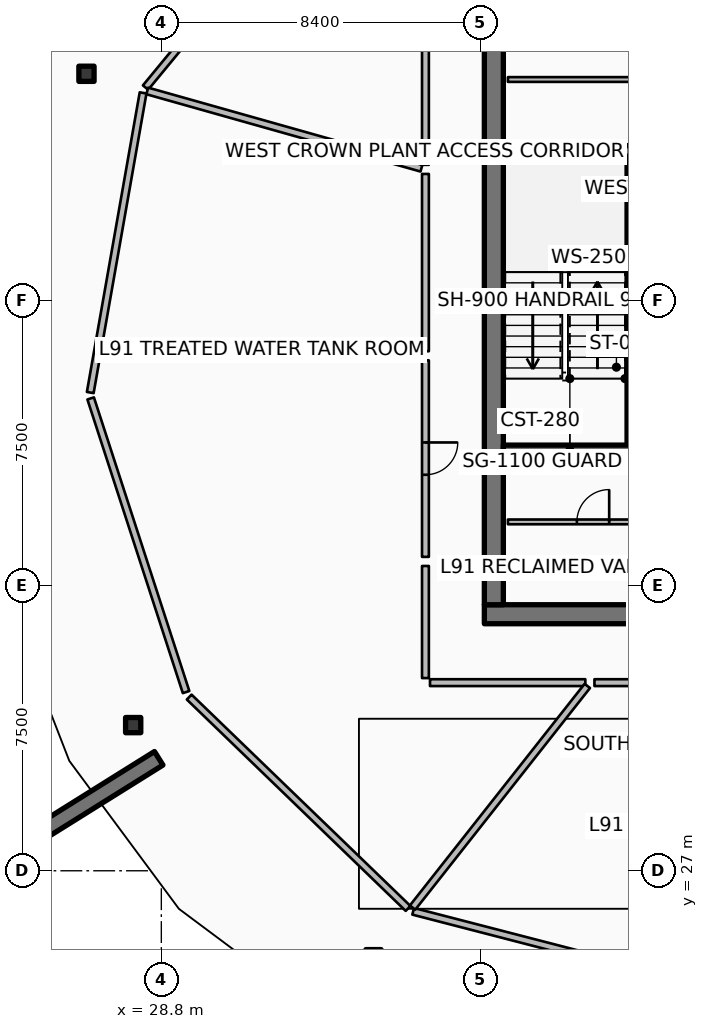
"""IFC4 building model, lengths in metres.
Left out: names, types, materials, properties, quantities, classifications, styles, units other than length and angle.
Written with IfcOpenShell. Run it as: python <this file> out.ifc"""

import sys

from ifc_helpers import new_model, si_unit, direction, frame, frame_2d, origin, origin_2d, place, context, subcontext, project, spatial, rectangle, hollow_rectangle, extrude, element, fill, save


model = new_model("IFC4")
c1 = context("Model", 3, precision=1e-05, world=origin(), true_north=direction((0.0, 1.0)))
c2 = subcontext(c1, "Body", "Model", "MODEL_VIEW")
j1 = project(units=[si_unit("LENGTHUNIT", "METRE"), si_unit("PLANEANGLEUNIT", "RADIAN")], contexts=[c1])
p1 = place(None, origin())
s1 = spatial("IfcSite", under=j1, at=p1, CompositionType="ELEMENT")
p2 = place(p1, origin())
s2 = spatial("IfcBuilding", under=s1, at=p2, CompositionType="ELEMENT")
p3 = place(p2, frame((0.0, 0.0, 363.2)))
s3 = spatial("IfcBuildingStorey", under=s2, at=p3, CompositionType="ELEMENT", Elevation=363.2)
p4 = place(p3, frame((37.3, 33.75, 0.0), z_axis=(0.0, 0.0, 1.0), x_axis=(1.0, 0.0, 0.0)))
e1 = element("IfcWall", 1, at=p4, inside=s3, PredefinedType="SHEAR", context=c2, shape_type="SweptSolid", body=[
    extrude(rectangle(XDim=9.6, YDim=0.5, at=frame_2d((4.8, 0.0))), origin(), (0.0, 0.0, 1.0), 3.6),
])
p5 = place(p3, frame((37.55, 34.0, 0.0), z_axis=(0.0, 0.0, 1.0), x_axis=(0.0, 1.0, 0.0)))
e2 = element("IfcWall", 2, at=p5, inside=s3, PredefinedType="SHEAR", context=c2, shape_type="SweptSolid", body=[
    extrude(rectangle(XDim=16.0, YDim=0.5, at=frame_2d((8.0, 0.0))), origin(), (0.0, 0.0, 1.0), 3.6),
])
for number, where, z_axis, x_axis in (
    (3, (37.8, 38.06, 0.0), (0.0, 0.0, 1.0), (1.0, 0.0, 0.0)),
    (4, (37.8, 45.94, 0.0), (0.0, 0.0, 1.0), (1.0, 0.0, 0.0)),
):
    element("IfcWall", number, at=place(p3, frame(where, z_axis=z_axis, x_axis=x_axis)), inside=s3, PredefinedType="SHEAR", context=c2, shape_type="SweptSolid", body=[
        extrude(rectangle(XDim=3.5, YDim=0.28, at=frame_2d((1.75, 0.0))), origin(), (0.0, 0.0, 1.0), 3.6),
    ])
p6 = place(p3, frame((28.731, 29.959, 0.0), z_axis=(0.0, 0.0, 1.0), x_axis=(-0.848033572426, -0.529942506352, 0.0)))
e5 = element("IfcWall", 5, at=p6, inside=s3, PredefinedType="SOLIDWALL", context=c2, shape_type="SweptSolid", body=[
    extrude(rectangle(XDim=3.5, YDim=0.42, at=frame_2d((1.75, 0.0))), origin(), (0.0, 0.0, 1.0), 3.6),
])
for number, where, z_axis, x_axis in (
    (6, (26.83, 47.97, 0.0), (0.0, 0.0, 1.0), (1.0, 0.0, 0.0)),
    (7, (28.059, 30.833, 0.0), (0.0, 0.0, 1.0), (1.0, 0.0, 0.0)),
):
    element("IfcColumn", number, at=place(p3, frame(where, z_axis=z_axis, x_axis=x_axis)), inside=s3, PredefinedType="COLUMN", context=c2, shape_type="SweptSolid", body=[
        extrude(hollow_rectangle(XDim=0.4, YDim=0.4, WallThickness=0.02, InnerFilletRadius=0.02, OuterFilletRadius=0.04, at=origin_2d()), origin(), (0.0, 0.0, 1.0), 3.32),
    ])
p7 = place(p3, frame((41.18, 38.22, 0.0), z_axis=(0.0, 0.0, 1.0), x_axis=(0.0, 1.0, 0.0)))
e8 = element("IfcWall", 8, at=p7, inside=s3, PredefinedType="SOLIDWALL", context=c2, shape_type="SweptSolid", body=[
    extrude(rectangle(XDim=7.56, YDim=0.25, at=frame_2d((3.78, 0.0))), origin(), (0.0, 0.0, 1.0), 3.32),
])
p8 = place(p7, frame((0.3, 0.0, 0.0)))
e9 = element("IfcOpeningElement", 9, at=p8, cuts=e8, PredefinedType="OPENING", context=c2, shape_type="SweptSolid", body=[
    extrude(rectangle(XDim=1.55, YDim=2.15, at=frame_2d((0.775, 1.075))), frame((0.0, 0.135, 0.0), z_axis=(0.0, -1.0, 0.0), x_axis=(1.0, 0.0, 0.0)), (0.0, 0.0, 1.0), 0.27),
])
p9 = place(p3, frame((37.92, 36.18, 0.0), z_axis=(0.0, 0.0, 1.0), x_axis=(1.0, 0.0, 0.0)))
e10 = element("IfcWall", 10, at=p9, inside=s3, PredefinedType="PARTITIONING", context=c2, shape_type="SweptSolid", body=[
    extrude(rectangle(XDim=4.48, YDim=0.125, at=frame_2d((2.24, 0.0))), origin(), (0.0, 0.0, 1.0), 2.76),
])
p10 = place(p9, frame((1.815, 0.0, 0.0)))
e11 = element("IfcOpeningElement", 11, at=p10, cuts=e10, PredefinedType="OPENING", context=c2, shape_type="SweptSolid", body=[
    extrude(rectangle(XDim=0.85, YDim=2.06, at=frame_2d((0.425, 1.03))), frame((0.0, 0.073, 0.0), z_axis=(0.0, -1.0, 0.0), x_axis=(1.0, 0.0, 0.0)), (0.0, 0.0, 1.0), 0.145),
])
p11 = place(p3, frame((37.92, 47.82, 0.0), z_axis=(0.0, 0.0, 1.0), x_axis=(1.0, 0.0, 0.0)))
e12 = element("IfcWall", 12, at=p11, inside=s3, PredefinedType="PARTITIONING", context=c2, shape_type="SweptSolid", body=[
    extrude(rectangle(XDim=8.78, YDim=0.125, at=frame_2d((4.39, 0.0))), origin(), (0.0, 0.0, 1.0), 2.76),
])
p12 = place(p11, frame((3.965, 0.0, 0.0)))
e13 = element("IfcOpeningElement", 13, at=p12, cuts=e12, PredefinedType="OPENING", context=c2, shape_type="SweptSolid", body=[
    extrude(rectangle(XDim=0.85, YDim=2.06, at=frame_2d((0.425, 1.03))), frame((0.0, 0.073, 0.0), z_axis=(0.0, -1.0, 0.0), x_axis=(1.0, 0.0, 0.0)), (0.0, 0.0, 1.0), 0.145),
])
p13 = place(p3, frame((33.258, 53.52, 0.0), z_axis=(0.0, 0.0, 1.0), x_axis=(-0.636018833443, -0.771673534278, 0.0)))
e14 = element("IfcWall", 14, at=p13, inside=s3, PredefinedType="PARTITIONING", context=c2, shape_type="SweptSolid", body=[
    extrude(rectangle(XDim=7.661, YDim=0.18, at=frame_2d((3.831, 0.0))), origin(), (0.0, 0.0, 1.0), 2.76),
])
p14 = place(p3, frame((28.32, 47.468, 0.0), z_axis=(0.0, 0.0, 1.0), x_axis=(-0.173668776466, -0.984804120666, 0.0)))
e15 = element("IfcWall", 15, at=p14, inside=s3, PredefinedType="PARTITIONING", context=c2, shape_type="SweptSolid", body=[
    extrude(rectangle(XDim=8.006, YDim=0.18, at=frame_2d((4.003, 0.0))), origin(), (0.0, 0.0, 1.0), 2.76),
])
p15 = place(p3, frame((26.941, 39.428, 0.0), z_axis=(0.0, 0.0, 1.0), x_axis=(0.309024234991, -0.951054163646, 0.0)))
e16 = element("IfcWall", 16, at=p15, inside=s3, PredefinedType="PARTITIONING", context=c2, shape_type="SweptSolid", body=[
    extrude(rectangle(XDim=8.124, YDim=0.18, at=frame_2d((4.062, 0.0))), origin(), (0.0, 0.0, 1.0), 2.76),
])
p16 = place(p3, frame((29.533, 31.57, 0.0), z_axis=(0.0, 0.0, 1.0), x_axis=(0.719364153135, -0.694633151516, 0.0)))
e17 = element("IfcWall", 17, at=p16, inside=s3, PredefinedType="PARTITIONING", context=c2, shape_type="SweptSolid", body=[
    extrude(rectangle(XDim=8.006, YDim=0.18, at=frame_2d((4.003, 0.0))), origin(), (0.0, 0.0, 1.0), 2.76),
])
p17 = place(p3, frame((35.427, 25.934, 0.0), z_axis=(0.0, 0.0, 1.0), x_axis=(0.968117205342, -0.250497658115, 0.0)))
e18 = element("IfcWall", 18, at=p17, inside=s3, PredefinedType="PARTITIONING", context=c2, shape_type="SweptSolid", body=[
    extrude(rectangle(XDim=7.662, YDim=0.18, at=frame_2d((3.831, 0.0))), origin(), (0.0, 0.0, 1.0), 2.76),
])
p18 = place(p3, frame((35.75, 51.537, 0.0), z_axis=(0.0, 0.0, 1.0), x_axis=(0.0, -1.0, 0.0)))
e19 = element("IfcWall", 19, at=p18, inside=s3, PredefinedType="PARTITIONING", context=c2, shape_type="SweptSolid", body=[
    extrude(rectangle(XDim=5.962, YDim=0.18, at=frame_2d((2.981, 0.0))), origin(), (0.0, 0.0, 1.0), 2.76),
])
p19 = place(p3, frame((35.644, 45.485, 0.0), z_axis=(0.0, 0.0, 1.0), x_axis=(-0.96245862205, 0.271428445159, 0.0)))
e20 = element("IfcWall", 20, at=p19, inside=s3, PredefinedType="PARTITIONING", context=c2, shape_type="SweptSolid", body=[
    extrude(rectangle(XDim=7.495, YDim=0.18, at=frame_2d((3.748, 0.0))), origin(), (0.0, 0.0, 1.0), 2.76),
])
p20 = place(p3, frame((35.75, 45.335, 0.0), z_axis=(0.0, 0.0, 1.0), x_axis=(0.0, -1.0, 0.0)))
e21 = element("IfcWall", 21, at=p20, inside=s3, PredefinedType="PARTITIONING", context=c2, shape_type="SweptSolid", body=[
    extrude(rectangle(XDim=4.665, YDim=0.18, at=frame_2d((2.333, 0.0))), origin(), (0.0, 0.0, 1.0), 2.76),
])
p21 = place(p3, frame((35.75, 40.43, 0.0), z_axis=(0.0, 0.0, 1.0), x_axis=(0.0, -1.0, 0.0)))
e22 = element("IfcWall", 22, at=p21, inside=s3, PredefinedType="PARTITIONING", context=c2, shape_type="SweptSolid", body=[
    extrude(rectangle(XDim=5.17, YDim=0.18, at=frame_2d((2.585, 0.0))), origin(), (0.0, 0.0, 1.0), 2.76),
])
p22 = place(p21, frame((2.16, 0.0, 0.0)))
e23 = element("IfcOpeningElement", 23, at=p22, cuts=e22, PredefinedType="OPENING", context=c2, shape_type="SweptSolid", body=[
    extrude(rectangle(XDim=0.85, YDim=2.06, at=frame_2d((0.425, 1.03))), frame((0.0, 0.1, 0.0), z_axis=(0.0, -1.0, 0.0), x_axis=(1.0, 0.0, 0.0)), (0.0, 0.0, 1.0), 0.2),
])
p23 = place(p3, frame((35.75, 35.02, 0.0), z_axis=(0.0, 0.0, 1.0), x_axis=(0.0, -1.0, 0.0)))
e24 = element("IfcWall", 24, at=p23, inside=s3, PredefinedType="PARTITIONING", context=c2, shape_type="SweptSolid", body=[
    extrude(rectangle(XDim=2.95, YDim=0.18, at=frame_2d((1.475, 0.0))), origin(), (0.0, 0.0, 1.0), 2.76),
])
p24 = place(p3, frame((35.87, 31.95, 0.0), z_axis=(0.0, 0.0, 1.0), x_axis=(1.0, 0.0, 0.0)))
e25 = element("IfcWall", 25, at=p24, inside=s3, PredefinedType="PARTITIONING", context=c2, shape_type="SweptSolid", body=[
    extrude(rectangle(XDim=4.087, YDim=0.18, at=frame_2d((2.043, 0.0))), origin(), (0.0, 0.0, 1.0), 2.76),
])
p25 = place(p3, frame((40.009, 31.864, 0.0), z_axis=(0.0, 0.0, 1.0), x_axis=(-0.619089811342, -0.785320192974, 0.0)))
e26 = element("IfcWall", 26, at=p25, inside=s3, PredefinedType="PARTITIONING", context=c2, shape_type="SweptSolid", body=[
    extrude(rectangle(XDim=7.426, YDim=0.18, at=frame_2d((3.713, 0.0))), origin(), (0.0, 0.0, 1.0), 2.76),
])
p26 = place(p3, frame((40.197, 31.95, 0.0), z_axis=(0.0, 0.0, 1.0), x_axis=(1.0, 0.0, 0.0)))
e27 = element("IfcWall", 27, at=p26, inside=s3, PredefinedType="PARTITIONING", context=c2, shape_type="SweptSolid", body=[
    extrude(rectangle(XDim=4.848, YDim=0.18, at=frame_2d((2.424, 0.0))), origin(), (0.0, 0.0, 1.0), 2.76),
])
p27 = place(p26, frame((1.899, 0.0, 0.0)))
e28 = element("IfcOpeningElement", 28, at=p27, cuts=e27, PredefinedType="OPENING", context=c2, shape_type="SweptSolid", body=[
    extrude(rectangle(XDim=1.05, YDim=2.1, at=frame_2d((0.525, 1.05))), frame((0.0, 0.1, 0.0), z_axis=(0.0, -1.0, 0.0), x_axis=(1.0, 0.0, 0.0)), (0.0, 0.0, 1.0), 0.2),
])
p28 = place(p10, origin())
e29 = element("IfcDoor", 29, at=p28, inside=s3, OperationType="SINGLE_SWING_RIGHT", PredefinedType="DOOR", context=c2, shape_type="SweptSolid", body=[
    extrude(rectangle(XDim=0.85, YDim=2.06, at=frame_2d((0.425, 1.03))), frame((0.0, 0.025, 0.0), z_axis=(0.0, -1.0, 0.0), x_axis=(1.0, 0.0, 0.0)), (0.0, 0.0, 1.0), 0.05),
])
fill(e11, e29)
p29 = place(p22, origin())
e30 = element("IfcDoor", 30, at=p29, inside=s3, OperationType="SINGLE_SWING_LEFT", PredefinedType="DOOR", context=c2, shape_type="SweptSolid", body=[
    extrude(rectangle(XDim=0.85, YDim=2.06, at=frame_2d((0.425, 1.03))), frame((0.0, 0.025, 0.0), z_axis=(0.0, -1.0, 0.0), x_axis=(1.0, 0.0, 0.0)), (0.0, 0.0, 1.0), 0.05),
])
fill(e23, e30)
save(model, sys.argv[1])
